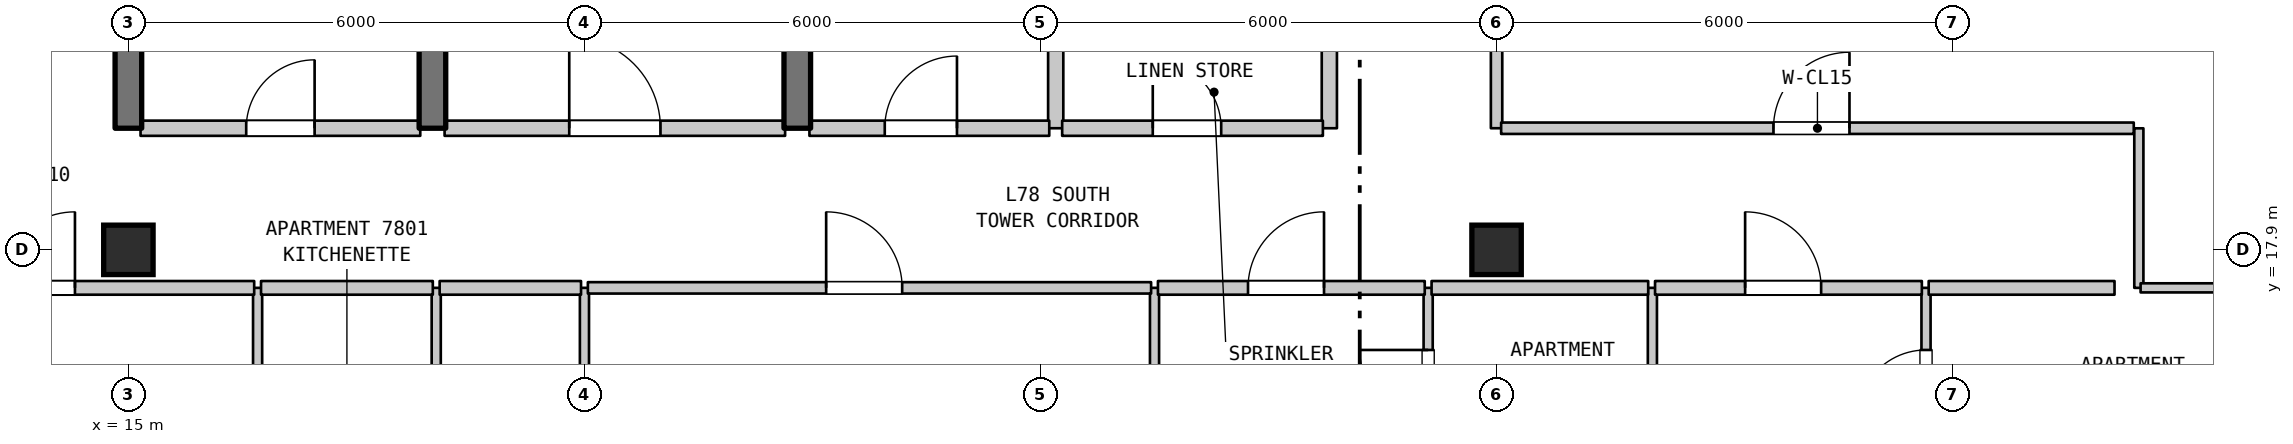
"""IFC4 building model, lengths in metres.
Left out: names, types, materials, properties, quantities, classifications, styles, units other than length and angle.
Written with IfcOpenShell. Run it as: python <this file> out.ifc"""

import sys

from ifc_helpers import new_model, si_unit, direction, frame, frame_2d, origin, origin_2d, place, context, subcontext, project, spatial, rectangle, extrude, element, fill, save


model = new_model("IFC4")
c1 = context("Model", 3, precision=1e-05, world=origin(), true_north=direction((0.0, 1.0)))
c2 = subcontext(c1, "Body", "Model", "MODEL_VIEW")
j1 = project(units=[si_unit("LENGTHUNIT", "METRE"), si_unit("PLANEANGLEUNIT", "RADIAN")], contexts=[c1])
p1 = place(None, origin())
s1 = spatial("IfcSite", under=j1, at=p1, CompositionType="ELEMENT")
p2 = place(p1, origin())
s2 = spatial("IfcBuilding", under=s1, at=p2, CompositionType="ELEMENT")
p3 = place(p2, frame((0.0, 0.0, 311.0)))
s3 = spatial("IfcBuildingStorey", under=s2, at=p3, CompositionType="ELEMENT", Elevation=311.0)
for number, where, z_axis, x_axis in (
    (1, (15.0, 17.9, 0.0), (0.0, 0.0, 1.0), (1.0, 0.0, 0.0)),
    (2, (33.0, 17.9, 0.0), (0.0, 0.0, 1.0), (1.0, 0.0, 0.0)),
):
    element("IfcColumn", number, at=place(p3, frame(where, z_axis=z_axis, x_axis=x_axis)), inside=s3, PredefinedType="COLUMN", context=c2, shape_type="SweptSolid", body=[
        extrude(rectangle(XDim=0.65, YDim=0.65, at=origin_2d()), origin(), (0.0, 0.0, 1.0), 3.7),
    ])
p4 = place(p3, frame((15.0, 19.5, 0.0), z_axis=(0.0, 0.0, 1.0), x_axis=(0.0, 1.0, 0.0)))
e3 = element("IfcWall", 3, at=p4, inside=s3, PredefinedType="SHEAR", context=c2, shape_type="SweptSolid", body=[
    extrude(rectangle(XDim=3.2, YDim=0.35, at=frame_2d((1.6, 0.0))), origin(), (0.0, 0.0, 1.0), 3.28),
])
p5 = place(p3, frame((16.7, 14.2, 0.0), z_axis=(0.0, 0.0, 1.0), x_axis=(0.0, 1.0, 0.0)))
e4 = element("IfcWall", 4, at=p5, inside=s3, PredefinedType="PARTITIONING", context=c2, shape_type="SweptSolid", body=[
    extrude(rectangle(XDim=3.2, YDim=0.12, at=frame_2d((1.6, 0.0))), origin(), (0.0, 0.0, 1.0), 3.28),
])
p6 = place(p5, frame((1.15, 0.0, 0.0)))
e5 = element("IfcOpeningElement", 5, at=p6, cuts=e4, PredefinedType="OPENING", context=c2, shape_type="SweptSolid", body=[
    extrude(rectangle(XDim=0.9, YDim=2.15, at=frame_2d((0.45, 1.075))), frame((0.0, 0.07, 0.0), z_axis=(0.0, -1.0, 0.0), x_axis=(1.0, 0.0, 0.0)), (0.0, 0.0, 1.0), 0.14),
])
p7 = place(p3, frame((19.0, 19.5, 0.0), z_axis=(0.0, 0.0, 1.0), x_axis=(0.0, 1.0, 0.0)))
e6 = element("IfcWall", 6, at=p7, inside=s3, PredefinedType="SHEAR", context=c2, shape_type="SweptSolid", body=[
    extrude(rectangle(XDim=3.2, YDim=0.35, at=frame_2d((1.6, 0.0))), origin(), (0.0, 0.0, 1.0), 3.28),
])
p8 = place(p3, frame((19.05, 14.2, 0.0), z_axis=(0.0, 0.0, 1.0), x_axis=(0.0, 1.0, 0.0)))
e7 = element("IfcWall", 7, at=p8, inside=s3, PredefinedType="PARTITIONING", context=c2, shape_type="SweptSolid", body=[
    extrude(rectangle(XDim=3.2, YDim=0.12, at=frame_2d((1.6, 0.0))), origin(), (0.0, 0.0, 1.0), 3.28),
])
p9 = place(p3, frame((21.0, 6.999, 0.0), z_axis=(0.0, 0.0, 1.0), x_axis=(0.0, 1.0, 0.0)))
e8 = element("IfcWall", 8, at=p9, inside=s3, PredefinedType="PARTITIONING", context=c2, shape_type="SweptSolid", body=[
    extrude(rectangle(XDim=10.401, YDim=0.12, at=frame_2d((5.2, 0.0))), origin(), (0.0, 0.0, 1.0), 3.28),
])
p10 = place(p3, frame((23.8, 19.5, 0.0), z_axis=(0.0, 0.0, 1.0), x_axis=(0.0, 1.0, 0.0)))
e9 = element("IfcWall", 9, at=p10, inside=s3, PredefinedType="SHEAR", context=c2, shape_type="SweptSolid", body=[
    extrude(rectangle(XDim=3.2, YDim=0.35, at=frame_2d((1.6, 0.0))), origin(), (0.0, 0.0, 1.0), 3.28),
])
p11 = place(p3, frame((27.2, 19.5, 0.0), z_axis=(0.0, 0.0, 1.0), x_axis=(0.0, 1.0, 0.0)))
e10 = element("IfcWall", 10, at=p11, inside=s3, PredefinedType="STANDARD", context=c2, shape_type="SweptSolid", body=[
    extrude(rectangle(XDim=1.6, YDim=0.2, at=frame_2d((0.8, 0.0))), origin(), (0.0, 0.0, 1.0), 3.28),
])
p12 = place(p3, frame((28.5, 6.71, 0.0), z_axis=(0.0, 0.0, 1.0), x_axis=(0.0, 1.0, 0.0)))
e11 = element("IfcWall", 11, at=p12, inside=s3, PredefinedType="PARTITIONING", context=c2, shape_type="SweptSolid", body=[
    extrude(rectangle(XDim=10.69, YDim=0.12, at=frame_2d((5.345, 0.0))), origin(), (0.0, 0.0, 1.0), 3.28),
])
p13 = place(p3, frame((30.8, 19.5, 0.0), z_axis=(0.0, 0.0, 1.0), x_axis=(0.0, 1.0, 0.0)))
e12 = element("IfcWall", 12, at=p13, inside=s3, PredefinedType="STANDARD", context=c2, shape_type="SweptSolid", body=[
    extrude(rectangle(XDim=1.6, YDim=0.2, at=frame_2d((0.8, 0.0))), origin(), (0.0, 0.0, 1.0), 3.28),
])
p14 = place(p3, frame((32.1, 15.008, 0.0), z_axis=(0.0, 0.0, 1.0), x_axis=(0.0, 1.0, 0.0)))
e13 = element("IfcWall", 13, at=p14, inside=s3, PredefinedType="PARTITIONING", context=c2, shape_type="SweptSolid", body=[
    extrude(rectangle(XDim=2.392, YDim=0.12, at=frame_2d((1.196, 0.0))), origin(), (0.0, 0.0, 1.0), 3.28),
])
p15 = place(p14, frame((0.675, 0.0, 0.0)))
e14 = element("IfcOpeningElement", 14, at=p15, cuts=e13, PredefinedType="OPENING", context=c2, shape_type="SweptSolid", body=[
    extrude(rectangle(XDim=0.9, YDim=2.1, at=frame_2d((0.45, 1.05))), frame((0.0, 0.07, 0.0), z_axis=(0.0, -1.0, 0.0), x_axis=(1.0, 0.0, 0.0)), (0.0, 0.0, 1.0), 0.14),
])
p16 = place(p3, frame((33.0, 19.5, 0.0), z_axis=(0.0, 0.0, 1.0), x_axis=(0.0, 1.0, 0.0)))
e15 = element("IfcWall", 15, at=p16, inside=s3, PredefinedType="STANDARD", context=c2, shape_type="SweptSolid", body=[
    extrude(rectangle(XDim=6.9, YDim=0.15, at=frame_2d((3.45, 0.0))), origin(), (0.0, 0.0, 1.0), 2.99),
])
p17 = place(p16, frame((3.944, 0.0, 0.0)))
e16 = element("IfcOpeningElement", 16, at=p17, cuts=e15, PredefinedType="OPENING", context=c2, shape_type="SweptSolid", body=[
    extrude(rectangle(XDim=1.0, YDim=2.15, at=frame_2d((0.5, 1.075))), frame((0.0, 0.085, 0.0), z_axis=(0.0, -1.0, 0.0), x_axis=(1.0, 0.0, 0.0)), (0.0, 0.0, 1.0), 0.17),
])
p18 = place(p3, frame((35.05, 15.008, 0.0), z_axis=(0.0, 0.0, 1.0), x_axis=(0.0, 1.0, 0.0)))
e17 = element("IfcWall", 17, at=p18, inside=s3, PredefinedType="PARTITIONING", context=c2, shape_type="SweptSolid", body=[
    extrude(rectangle(XDim=2.392, YDim=0.12, at=frame_2d((1.196, 0.0))), origin(), (0.0, 0.0, 1.0), 3.28),
])
p19 = place(p3, frame((38.65, 15.008, 0.0), z_axis=(0.0, 0.0, 1.0), x_axis=(0.0, 1.0, 0.0)))
e18 = element("IfcWall", 18, at=p19, inside=s3, PredefinedType="PARTITIONING", context=c2, shape_type="SweptSolid", body=[
    extrude(rectangle(XDim=2.392, YDim=0.12, at=frame_2d((1.196, 0.0))), origin(), (0.0, 0.0, 1.0), 3.28),
])
p20 = place(p19, frame((0.675, 0.0, 0.0)))
e19 = element("IfcOpeningElement", 19, at=p20, cuts=e18, PredefinedType="OPENING", context=c2, shape_type="SweptSolid", body=[
    extrude(rectangle(XDim=0.9, YDim=2.1, at=frame_2d((0.45, 1.05))), frame((0.0, 0.07, 0.0), z_axis=(0.0, -1.0, 0.0), x_axis=(1.0, 0.0, 0.0)), (0.0, 0.0, 1.0), 0.14),
])
p21 = place(p3, frame((41.45, 17.4, 0.0), z_axis=(0.0, 0.0, 1.0), x_axis=(0.0, 1.0, 0.0)))
e20 = element("IfcWall", 20, at=p21, inside=s3, PredefinedType="PARTITIONING", context=c2, shape_type="SweptSolid", body=[
    extrude(rectangle(XDim=2.099, YDim=0.12, at=frame_2d((1.05, 0.0))), origin(), (0.0, 0.0, 1.0), 3.28),
])
p22 = place(p3, frame((12.975, 17.4, 0.0), z_axis=(0.0, 0.0, 1.0), x_axis=(1.0, 0.0, 0.0)))
e21 = element("IfcWall", 21, at=p22, inside=s3, PredefinedType="STANDARD", context=c2, shape_type="SweptSolid", body=[
    extrude(rectangle(XDim=3.68, YDim=0.18, at=frame_2d((1.84, 0.0))), origin(), (0.0, 0.0, 1.0), 3.28),
])
p23 = place(p22, frame((0.322, 0.0, 0.0)))
e22 = element("IfcOpeningElement", 22, at=p23, cuts=e21, PredefinedType="OPENING", context=c2, shape_type="SweptSolid", body=[
    extrude(rectangle(XDim=1.0, YDim=2.15, at=frame_2d((0.5, 1.075))), frame((0.0, 0.1, 0.0), z_axis=(0.0, -1.0, 0.0), x_axis=(1.0, 0.0, 0.0)), (0.0, 0.0, 1.0), 0.2),
])
p24 = place(p3, frame((16.745, 17.4, 0.0), z_axis=(0.0, 0.0, 1.0), x_axis=(1.0, 0.0, 0.0)))
e23 = element("IfcWall", 23, at=p24, inside=s3, PredefinedType="STANDARD", context=c2, shape_type="SweptSolid", body=[
    extrude(rectangle(XDim=2.26, YDim=0.18, at=frame_2d((1.13, 0.0))), origin(), (0.0, 0.0, 1.0), 3.28),
])
p25 = place(p3, frame((19.095, 17.4, 0.0), z_axis=(0.0, 0.0, 1.0), x_axis=(1.0, 0.0, 0.0)))
e24 = element("IfcWall", 24, at=p25, inside=s3, PredefinedType="STANDARD", context=c2, shape_type="SweptSolid", body=[
    extrude(rectangle(XDim=1.86, YDim=0.18, at=frame_2d((0.93, 0.0))), origin(), (0.0, 0.0, 1.0), 3.28),
])
p26 = place(p3, frame((21.045, 17.4, 0.0), z_axis=(0.0, 0.0, 1.0), x_axis=(1.0, 0.0, 0.0)))
e25 = element("IfcWall", 25, at=p26, inside=s3, PredefinedType="STANDARD", context=c2, shape_type="SweptSolid", body=[
    extrude(rectangle(XDim=7.41, YDim=0.15, at=frame_2d((3.705, 0.0))), origin(), (0.0, 0.0, 1.0), 3.28),
])
p27 = place(p26, frame((3.135, 0.0, 0.0)))
e26 = element("IfcOpeningElement", 26, at=p27, cuts=e25, PredefinedType="OPENING", context=c2, shape_type="SweptSolid", body=[
    extrude(rectangle(XDim=1.0, YDim=2.15, at=frame_2d((0.5, 1.075))), frame((0.0, 0.085, 0.0), z_axis=(0.0, -1.0, 0.0), x_axis=(1.0, 0.0, 0.0)), (0.0, 0.0, 1.0), 0.17),
])
p28 = place(p3, frame((28.545, 17.4, 0.0), z_axis=(0.0, 0.0, 1.0), x_axis=(1.0, 0.0, 0.0)))
e27 = element("IfcWall", 27, at=p28, inside=s3, PredefinedType="STANDARD", context=c2, shape_type="SweptSolid", body=[
    extrude(rectangle(XDim=3.51, YDim=0.18, at=frame_2d((1.755, 0.0))), origin(), (0.0, 0.0, 1.0), 3.28),
])
p29 = place(p28, frame((1.185, 0.0, 0.0)))
e28 = element("IfcOpeningElement", 28, at=p29, cuts=e27, PredefinedType="OPENING", context=c2, shape_type="SweptSolid", body=[
    extrude(rectangle(XDim=1.0, YDim=2.15, at=frame_2d((0.5, 1.075))), frame((0.0, 0.1, 0.0), z_axis=(0.0, -1.0, 0.0), x_axis=(1.0, 0.0, 0.0)), (0.0, 0.0, 1.0), 0.2),
])
p30 = place(p3, frame((32.145, 17.4, 0.0), z_axis=(0.0, 0.0, 1.0), x_axis=(1.0, 0.0, 0.0)))
e29 = element("IfcWall", 29, at=p30, inside=s3, PredefinedType="STANDARD", context=c2, shape_type="SweptSolid", body=[
    extrude(rectangle(XDim=2.85, YDim=0.18, at=frame_2d((1.425, 0.0))), origin(), (0.0, 0.0, 1.0), 3.28),
])
p31 = place(p3, frame((35.085, 17.4, 0.0), z_axis=(0.0, 0.0, 1.0), x_axis=(1.0, 0.0, 0.0)))
e30 = element("IfcWall", 30, at=p31, inside=s3, PredefinedType="STANDARD", context=c2, shape_type="SweptSolid", body=[
    extrude(rectangle(XDim=3.51, YDim=0.18, at=frame_2d((1.755, 0.0))), origin(), (0.0, 0.0, 1.0), 3.28),
])
p32 = place(p31, frame((1.185, 0.0, 0.0)))
e31 = element("IfcOpeningElement", 31, at=p32, cuts=e30, PredefinedType="OPENING", context=c2, shape_type="SweptSolid", body=[
    extrude(rectangle(XDim=1.0, YDim=2.15, at=frame_2d((0.5, 1.075))), frame((0.0, 0.1, 0.0), z_axis=(0.0, -1.0, 0.0), x_axis=(1.0, 0.0, 0.0)), (0.0, 0.0, 1.0), 0.2),
])
p33 = place(p3, frame((38.685, 17.4, 0.0), z_axis=(0.0, 0.0, 1.0), x_axis=(1.0, 0.0, 0.0)))
e32 = element("IfcWall", 32, at=p33, inside=s3, PredefinedType="STANDARD", context=c2, shape_type="SweptSolid", body=[
    extrude(rectangle(XDim=2.445, YDim=0.18, at=frame_2d((1.222, 0.0))), origin(), (0.0, 0.0, 1.0), 3.28),
])
p34 = place(p3, frame((41.473, 17.4, 0.0), z_axis=(0.0, 0.0, 1.0), x_axis=(1.0, 0.0, 0.0)))
e33 = element("IfcWall", 33, at=p34, inside=s3, PredefinedType="PARTITIONING", context=c2, shape_type="SweptSolid", body=[
    extrude(rectangle(XDim=2.031, YDim=0.12, at=frame_2d((1.016, 0.0))), origin(), (0.0, 0.0, 1.0), 3.28),
])
p35 = place(p3, frame((15.16, 19.5, 0.0), z_axis=(0.0, 0.0, 1.0), x_axis=(1.0, 0.0, 0.0)))
e34 = element("IfcWall", 34, at=p35, inside=s3, PredefinedType="STANDARD", context=c2, shape_type="SweptSolid", body=[
    extrude(rectangle(XDim=3.68, YDim=0.2, at=frame_2d((1.84, 0.0))), origin(), (0.0, 0.0, 1.0), 3.28),
])
p36 = place(p35, frame((1.39, 0.0, 0.0)))
e35 = element("IfcOpeningElement", 35, at=p36, cuts=e34, PredefinedType="OPENING", context=c2, shape_type="SweptSolid", body=[
    extrude(rectangle(XDim=0.9, YDim=2.15, at=frame_2d((0.45, 1.075))), frame((0.0, 0.11, 0.0), z_axis=(0.0, -1.0, 0.0), x_axis=(1.0, 0.0, 0.0)), (0.0, 0.0, 1.0), 0.22),
])
p37 = place(p3, frame((19.16, 19.5, 0.0), z_axis=(0.0, 0.0, 1.0), x_axis=(1.0, 0.0, 0.0)))
e36 = element("IfcWall", 36, at=p37, inside=s3, PredefinedType="STANDARD", context=c2, shape_type="SweptSolid", body=[
    extrude(rectangle(XDim=4.48, YDim=0.2, at=frame_2d((2.24, 0.0))), origin(), (0.0, 0.0, 1.0), 3.28),
])
p38 = place(p37, frame((1.64, 0.0, 0.0)))
e37 = element("IfcOpeningElement", 37, at=p38, cuts=e36, PredefinedType="OPENING", context=c2, shape_type="SweptSolid", body=[
    extrude(rectangle(XDim=1.2, YDim=2.2, at=frame_2d((0.6, 1.1))), frame((0.0, 0.11, 0.0), z_axis=(0.0, -1.0, 0.0), x_axis=(1.0, 0.0, 0.0)), (0.0, 0.0, 1.0), 0.22),
])
p39 = place(p3, frame((23.96, 19.5, 0.0), z_axis=(0.0, 0.0, 1.0), x_axis=(1.0, 0.0, 0.0)))
e38 = element("IfcWall", 38, at=p39, inside=s3, PredefinedType="STANDARD", context=c2, shape_type="SweptSolid", body=[
    extrude(rectangle(XDim=3.155, YDim=0.2, at=frame_2d((1.578, 0.0))), origin(), (0.0, 0.0, 1.0), 3.28),
])
p40 = place(p39, frame((0.991, 0.0, 0.0)))
e39 = element("IfcOpeningElement", 39, at=p40, cuts=e38, PredefinedType="OPENING", context=c2, shape_type="SweptSolid", body=[
    extrude(rectangle(XDim=0.95, YDim=2.15, at=frame_2d((0.475, 1.075))), frame((0.0, 0.11, 0.0), z_axis=(0.0, -1.0, 0.0), x_axis=(1.0, 0.0, 0.0)), (0.0, 0.0, 1.0), 0.22),
])
p41 = place(p3, frame((27.285, 19.5, 0.0), z_axis=(0.0, 0.0, 1.0), x_axis=(1.0, 0.0, 0.0)))
e40 = element("IfcWall", 40, at=p41, inside=s3, PredefinedType="STANDARD", context=c2, shape_type="SweptSolid", body=[
    extrude(rectangle(XDim=3.43, YDim=0.2, at=frame_2d((1.715, 0.0))), origin(), (0.0, 0.0, 1.0), 3.28),
])
p42 = place(p41, frame((1.192, 0.0, 0.0)))
e41 = element("IfcOpeningElement", 41, at=p42, cuts=e40, PredefinedType="OPENING", context=c2, shape_type="SweptSolid", body=[
    extrude(rectangle(XDim=0.9, YDim=2.15, at=frame_2d((0.45, 1.075))), frame((0.0, 0.11, 0.0), z_axis=(0.0, -1.0, 0.0), x_axis=(1.0, 0.0, 0.0)), (0.0, 0.0, 1.0), 0.22),
])
p43 = place(p3, frame((33.06, 19.5, 0.0), z_axis=(0.0, 0.0, 1.0), x_axis=(1.0, 0.0, 0.0)))
e42 = element("IfcWall", 42, at=p43, inside=s3, PredefinedType="STANDARD", context=c2, shape_type="SweptSolid", body=[
    extrude(rectangle(XDim=8.323, YDim=0.15, at=frame_2d((4.162, 0.0))), origin(), (0.0, 0.0, 1.0), 3.28),
])
p44 = place(p43, frame((3.583, 0.0, 0.0)))
e43 = element("IfcOpeningElement", 43, at=p44, cuts=e42, PredefinedType="OPENING", context=c2, shape_type="SweptSolid", body=[
    extrude(rectangle(XDim=1.0, YDim=2.15, at=frame_2d((0.5, 1.075))), frame((0.0, 0.085, 0.0), z_axis=(0.0, -1.0, 0.0), x_axis=(1.0, 0.0, 0.0)), (0.0, 0.0, 1.0), 0.17),
])
p45 = place(p15, origin())
e44 = element("IfcDoor", 44, at=p45, inside=s3, OperationType="SINGLE_SWING_RIGHT", PredefinedType="DOOR", context=c2, shape_type="SweptSolid", body=[
    extrude(rectangle(XDim=0.9, YDim=2.1, at=frame_2d((0.45, 1.05))), frame((0.0, 0.025, 0.0), z_axis=(0.0, -1.0, 0.0), x_axis=(1.0, 0.0, 0.0)), (0.0, 0.0, 1.0), 0.05),
])
fill(e14, e44)
p46 = place(p20, origin())
e45 = element("IfcDoor", 45, at=p46, inside=s3, OperationType="SINGLE_SWING_LEFT", PredefinedType="DOOR", context=c2, shape_type="SweptSolid", body=[
    extrude(rectangle(XDim=0.9, YDim=2.1, at=frame_2d((0.45, 1.05))), frame((0.0, 0.025, 0.0), z_axis=(0.0, -1.0, 0.0), x_axis=(1.0, 0.0, 0.0)), (0.0, 0.0, 1.0), 0.05),
])
fill(e19, e45)
p47 = place(p23, origin())
e46 = element("IfcDoor", 46, at=p47, inside=s3, OperationType="SINGLE_SWING_RIGHT", PredefinedType="DOOR", context=c2, shape_type="SweptSolid", body=[
    extrude(rectangle(XDim=1.0, YDim=2.15, at=frame_2d((0.5, 1.075))), frame((0.0, 0.025, 0.0), z_axis=(0.0, -1.0, 0.0), x_axis=(1.0, 0.0, 0.0)), (0.0, 0.0, 1.0), 0.05),
])
fill(e22, e46)
p48 = place(p27, origin())
e47 = element("IfcDoor", 47, at=p48, inside=s3, OperationType="SINGLE_SWING_LEFT", PredefinedType="DOOR", context=c2, shape_type="SweptSolid", body=[
    extrude(rectangle(XDim=1.0, YDim=2.15, at=frame_2d((0.5, 1.075))), frame((0.0, 0.025, 0.0), z_axis=(0.0, -1.0, 0.0), x_axis=(1.0, 0.0, 0.0)), (0.0, 0.0, 1.0), 0.05),
])
fill(e26, e47)
p49 = place(p29, origin())
e48 = element("IfcDoor", 48, at=p49, inside=s3, OperationType="SINGLE_SWING_RIGHT", PredefinedType="DOOR", context=c2, shape_type="SweptSolid", body=[
    extrude(rectangle(XDim=1.0, YDim=2.15, at=frame_2d((0.5, 1.075))), frame((0.0, 0.025, 0.0), z_axis=(0.0, -1.0, 0.0), x_axis=(1.0, 0.0, 0.0)), (0.0, 0.0, 1.0), 0.05),
])
fill(e28, e48)
p50 = place(p32, origin())
e49 = element("IfcDoor", 49, at=p50, inside=s3, OperationType="SINGLE_SWING_LEFT", PredefinedType="DOOR", context=c2, shape_type="SweptSolid", body=[
    extrude(rectangle(XDim=1.0, YDim=2.15, at=frame_2d((0.5, 1.075))), frame((0.0, 0.025, 0.0), z_axis=(0.0, -1.0, 0.0), x_axis=(1.0, 0.0, 0.0)), (0.0, 0.0, 1.0), 0.05),
])
fill(e31, e49)
p51 = place(p36, origin())
e50 = element("IfcDoor", 50, at=p51, inside=s3, OperationType="SINGLE_SWING_RIGHT", PredefinedType="DOOR", context=c2, shape_type="SweptSolid", body=[
    extrude(rectangle(XDim=0.9, YDim=2.15, at=frame_2d((0.45, 1.075))), frame((0.0, 0.025, 0.0), z_axis=(0.0, -1.0, 0.0), x_axis=(1.0, 0.0, 0.0)), (0.0, 0.0, 1.0), 0.05),
])
fill(e35, e50)
p52 = place(p38, origin())
e51 = element("IfcDoor", 51, at=p52, inside=s3, OperationType="SINGLE_SWING_LEFT", PredefinedType="DOOR", context=c2, shape_type="SweptSolid", body=[
    extrude(rectangle(XDim=1.2, YDim=2.2, at=frame_2d((0.6, 1.1))), frame((0.0, 0.025, 0.0), z_axis=(0.0, -1.0, 0.0), x_axis=(1.0, 0.0, 0.0)), (0.0, 0.0, 1.0), 0.05),
])
fill(e37, e51)
p53 = place(p40, origin())
e52 = element("IfcDoor", 52, at=p53, inside=s3, OperationType="SINGLE_SWING_RIGHT", PredefinedType="DOOR", context=c2, shape_type="SweptSolid", body=[
    extrude(rectangle(XDim=0.95, YDim=2.15, at=frame_2d((0.475, 1.075))), frame((0.0, 0.025, 0.0), z_axis=(0.0, -1.0, 0.0), x_axis=(1.0, 0.0, 0.0)), (0.0, 0.0, 1.0), 0.05),
])
fill(e39, e52)
p54 = place(p42, origin())
e53 = element("IfcDoor", 53, at=p54, inside=s3, OperationType="SINGLE_SWING_LEFT", PredefinedType="DOOR", context=c2, shape_type="SweptSolid", body=[
    extrude(rectangle(XDim=0.9, YDim=2.15, at=frame_2d((0.45, 1.075))), frame((0.0, 0.025, 0.0), z_axis=(0.0, -1.0, 0.0), x_axis=(1.0, 0.0, 0.0)), (0.0, 0.0, 1.0), 0.05),
])
fill(e41, e53)
p55 = place(p44, origin())
e54 = element("IfcDoor", 54, at=p55, inside=s3, OperationType="SINGLE_SWING_RIGHT", PredefinedType="DOOR", context=c2, shape_type="SweptSolid", body=[
    extrude(rectangle(XDim=1.0, YDim=2.15, at=frame_2d((0.5, 1.075))), frame((0.0, 0.025, 0.0), z_axis=(0.0, -1.0, 0.0), x_axis=(1.0, 0.0, 0.0)), (0.0, 0.0, 1.0), 0.05),
])
fill(e43, e54)
save(model, sys.argv[1])
